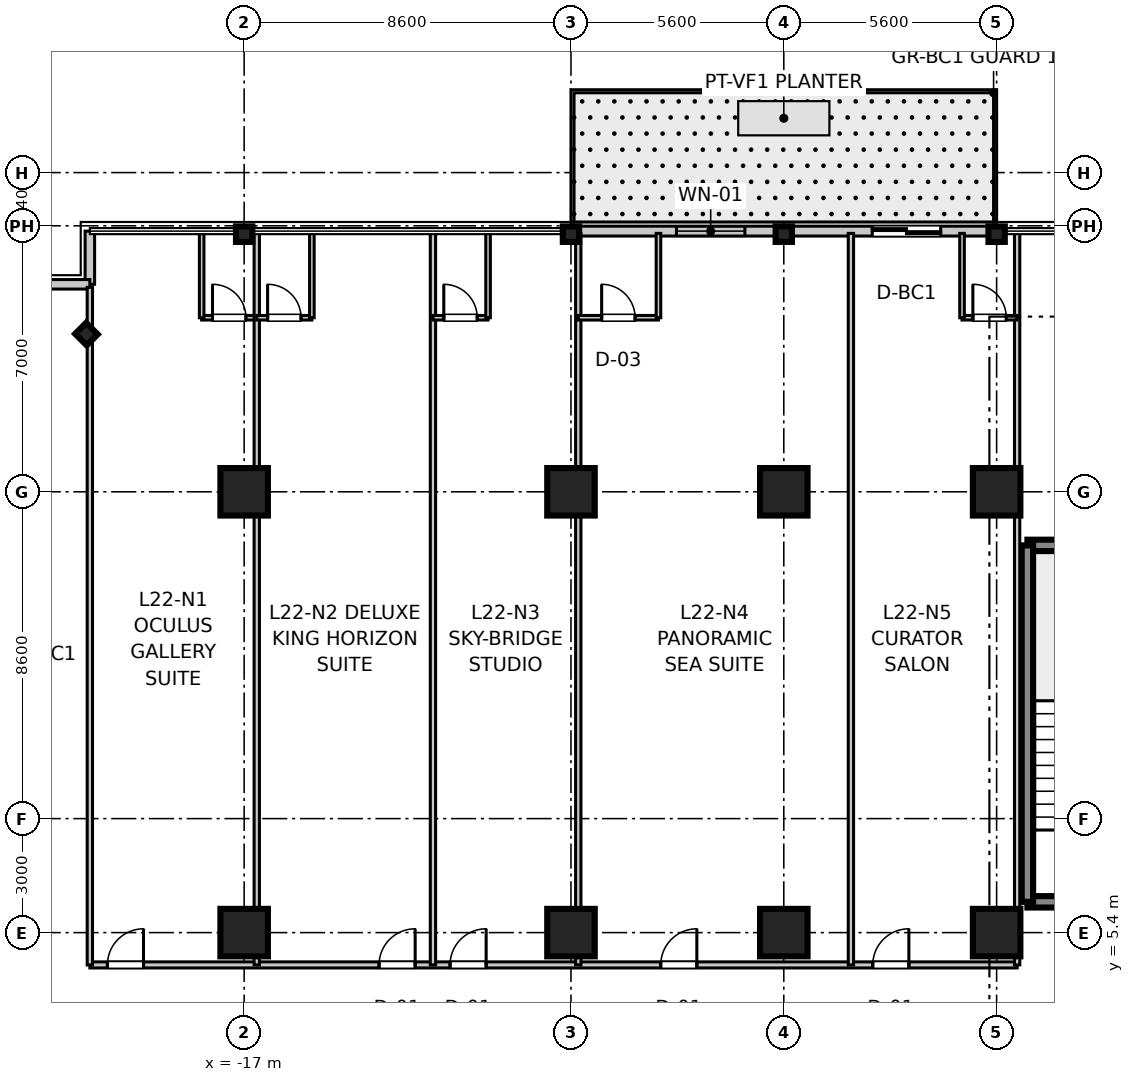
"""IFC4 building model, lengths in metres.
Left out: names, types, materials, properties, quantities, classifications, styles, units other than length and angle.
Written with IfcOpenShell. Run it as: python <this file> out.ifc"""

import sys

from ifc_helpers import new_model, si_unit, direction, frame, frame_2d, origin, origin_2d, place, context, subcontext, project, spatial, rectangle, i_section, extrude, source, transform, mapped, element, fill, save


model = new_model("IFC4")
c1 = context("Model", 3, precision=1e-05, world=origin(), true_north=direction((0.0, 1.0)))
c2 = subcontext(c1, "Body", "Model", "MODEL_VIEW")
j1 = project(units=[si_unit("LENGTHUNIT", "METRE"), si_unit("PLANEANGLEUNIT", "RADIAN")], contexts=[c1])
p1 = place(None, origin())
s1 = spatial("IfcSite", under=j1, at=p1, CompositionType="ELEMENT")
p2 = place(p1, origin())
s2 = spatial("IfcBuilding", under=s1, at=p2, CompositionType="ELEMENT")
p3 = place(p2, frame((0.0, 0.0, 91.95)))
s3 = spatial("IfcBuildingStorey", under=s2, at=p3, CompositionType="ELEMENT", Elevation=91.95)
m1 = source(origin(), c2, "Body", "SweptSolid", [
    extrude(rectangle(XDim=1.25, YDim=1.25, at=origin_2d()), origin(), (0.0, 0.0, 1.0), 3.605),
])
for number, where, z_axis, x_axis in (
    (1, (-17.0, 5.4, 0.0), (0.0, 0.0, 1.0), (1.0, 0.0, 0.0)),
    (2, (-17.0, 17.0, 0.0), (0.0, 0.0, 1.0), (1.0, 0.0, 0.0)),
    (3, (-8.4, 5.4, 0.0), (0.0, 0.0, 1.0), (1.0, 0.0, 0.0)),
    (4, (-8.4, 17.0, 0.0), (0.0, 0.0, 1.0), (1.0, 0.0, 0.0)),
    (5, (-2.8, 5.4, 0.0), (0.0, 0.0, 1.0), (1.0, 0.0, 0.0)),
    (6, (-2.8, 17.0, 0.0), (0.0, 0.0, 1.0), (1.0, 0.0, 0.0)),
    (7, (2.8, 5.4, 0.0), (0.0, 0.0, 1.0), (1.0, 0.0, 0.0)),
    (8, (2.8, 17.0, 0.0), (0.0, 0.0, 1.0), (1.0, 0.0, 0.0)),
):
    element("IfcColumn", number, at=place(p3, frame(where, z_axis=z_axis, x_axis=x_axis)), inside=s3, PredefinedType="COLUMN", context=c2, shape_type="MappedRepresentation", body=[
        mapped(m1, transform((0.0, 0.0, 0.0), scale=1.0)),
    ])
m2 = source(origin(), c2, "Body", "SweptSolid", [
    extrude(i_section(OverallWidth=0.409, OverallDepth=0.43, WebThickness=0.021, FlangeThickness=0.034, at=origin_2d()), origin(), (0.0, 0.0, 1.0), 3.605),
])
for number, where, z_axis, x_axis in (
    (9, (-17.0, 23.78, 0.0), (0.0, 0.0, 1.0), (0.0, 1.0, 0.0)),
    (10, (-8.4, 23.78, 0.0), (0.0, 0.0, 1.0), (0.0, 1.0, 0.0)),
    (11, (-2.8, 23.78, 0.0), (0.0, 0.0, 1.0), (0.0, 1.0, 0.0)),
    (12, (2.8, 23.78, 0.0), (0.0, 0.0, 1.0), (0.0, 1.0, 0.0)),
    (13, (-21.15, 21.15, 0.0), (0.0, 0.0, 1.0), (0.707, 0.707, 0.0)),
):
    element("IfcColumn", number, at=place(p3, frame(where, z_axis=z_axis, x_axis=x_axis)), inside=s3, PredefinedType="COLUMN", context=c2, shape_type="MappedRepresentation", body=[
        mapped(m2, transform((0.0, 0.0, 0.0), scale=1.0)),
    ])
m3 = source(origin(), c2, "Body", "SweptSolid", [
    extrude(rectangle(XDim=3.98, YDim=0.3, at=frame_2d((1.99, 0.0))), origin(), (0.0, 0.0, 1.0), 3.38),
])
for number, where, z_axis, x_axis in (
    (14, (3.61, 6.21, 0.0), (0.0, 0.0, 1.0), (1.0, 0.0, 0.0)),
    (15, (3.61, 15.59, 0.0), (0.0, 0.0, 1.0), (1.0, 0.0, 0.0)),
):
    element("IfcWall", number, at=place(p3, frame(where, z_axis=z_axis, x_axis=x_axis)), inside=s3, PredefinedType="SHEAR", context=c2, shape_type="MappedRepresentation", body=[
        mapped(m3, transform((0.0, 0.0, 0.0), scale=1.0)),
    ])
m4 = source(origin(), c2, "Body", "SweptSolid", [
    extrude(rectangle(XDim=9.38, YDim=0.3, at=frame_2d((4.69, 0.0))), origin(), (0.0, 0.0, 1.0), 3.38),
])
p4 = place(p3, frame((3.61, 6.21, 0.0), z_axis=(0.0, 0.0, 1.0), x_axis=(0.0, 1.0, 0.0)))
e16 = element("IfcWall", 16, at=p4, inside=s3, PredefinedType="SHEAR", context=c2, shape_type="MappedRepresentation", body=[
    mapped(m4, transform((0.0, 0.0, 0.0), scale=1.0)),
])
m5 = source(origin(), c2, "Body", "SweptSolid", [
    extrude(rectangle(XDim=1.4, YDim=0.25, at=frame_2d((0.7, 0.0))), origin(), (0.0, 0.0, 1.0), 3.38),
])
p5 = place(p3, frame((-21.06, 22.46, 0.0), z_axis=(0.0, 0.0, 1.0), x_axis=(0.0, 1.0, 0.0)))
e17 = element("IfcWall", 17, at=p5, inside=s3, PredefinedType="STANDARD", context=c2, shape_type="MappedRepresentation", body=[
    mapped(m5, transform((0.0, 0.0, 0.0), scale=1.0)),
])
m6 = source(origin(), c2, "Body", "SweptSolid", [
    extrude(rectangle(XDim=1.4, YDim=0.25, at=frame_2d((0.7, 0.0))), origin(), (0.0, 0.0, 1.0), 3.38),
])
p6 = place(p3, frame((-22.46, 22.46, 0.0), z_axis=(0.0, 0.0, 1.0), x_axis=(1.0, 0.0, 0.0)))
e18 = element("IfcWall", 18, at=p6, inside=s3, PredefinedType="STANDARD", context=c2, shape_type="MappedRepresentation", body=[
    mapped(m6, transform((0.0, 0.0, 0.0), scale=1.0)),
])
m7 = source(origin(), c2, "Body", "SweptSolid", [
    extrude(rectangle(XDim=11.2, YDim=0.26, at=frame_2d((5.6, 0.0))), origin(), (0.0, 0.0, 1.0), 2.86),
])
p7 = place(p3, frame((-8.4, 23.86, 0.0), z_axis=(0.0, 0.0, 1.0), x_axis=(1.0, 0.0, 0.0)))
e19 = element("IfcWall", 19, at=p7, inside=s3, PredefinedType="STANDARD", context=c2, shape_type="MappedRepresentation", body=[
    mapped(m7, transform((0.0, 0.0, 0.0), scale=1.0)),
])
p8 = place(p7, frame((7.928, 0.0, 0.0)))
e20 = element("IfcOpeningElement", 20, at=p8, cuts=e19, PredefinedType="OPENING", context=c2, shape_type="SweptSolid", body=[
    extrude(rectangle(XDim=1.8, YDim=2.25, at=frame_2d((0.9, 1.125))), frame((0.0, 0.14, 0.0), z_axis=(0.0, -1.0, 0.0), x_axis=(1.0, 0.0, 0.0)), (0.0, 0.0, 1.0), 0.28),
])
p9 = place(p7, frame((2.776, 0.0, 0.85)))
e21 = element("IfcOpeningElement", 21, at=p9, cuts=e19, PredefinedType="OPENING", context=c2, shape_type="SweptSolid", body=[
    extrude(rectangle(XDim=1.8, YDim=1.5, at=frame_2d((0.9, 0.75))), frame((0.0, 0.14, 0.0), z_axis=(0.0, -1.0, 0.0), x_axis=(1.0, 0.0, 0.0)), (0.0, 0.0, 1.0), 0.28),
])
m8 = source(origin(), c2, "Body", "SweptSolid", [
    extrude(rectangle(XDim=24.4, YDim=0.16, at=frame_2d((12.2, 0.0))), origin(), (0.0, 0.0, 1.0), 2.72),
])
p10 = place(p3, frame((-21.06, 4.55, 0.0), z_axis=(0.0, 0.0, 1.0), x_axis=(1.0, 0.0, 0.0)))
e22 = element("IfcWall", 22, at=p10, inside=s3, PredefinedType="PARTITIONING", context=c2, shape_type="MappedRepresentation", body=[
    mapped(m8, transform((0.0, 0.0, 0.0), scale=1.0)),
])
p11 = place(p10, frame((0.462, 0.0, 0.0)))
e23 = element("IfcOpeningElement", 23, at=p11, cuts=e22, PredefinedType="OPENING", context=c2, shape_type="SweptSolid", body=[
    extrude(rectangle(XDim=0.95, YDim=2.1, at=frame_2d((0.475, 1.05))), frame((0.0, 0.09, 0.0), z_axis=(0.0, -1.0, 0.0), x_axis=(1.0, 0.0, 0.0)), (0.0, 0.0, 1.0), 0.18),
])
p12 = place(p10, frame((7.61, 0.0, 0.0)))
e24 = element("IfcOpeningElement", 24, at=p12, cuts=e22, PredefinedType="OPENING", context=c2, shape_type="SweptSolid", body=[
    extrude(rectangle(XDim=0.95, YDim=2.1, at=frame_2d((0.475, 1.05))), frame((0.0, 0.09, 0.0), z_axis=(0.0, -1.0, 0.0), x_axis=(1.0, 0.0, 0.0)), (0.0, 0.0, 1.0), 0.18),
])
p13 = place(p10, frame((9.478, 0.0, 0.0)))
e25 = element("IfcOpeningElement", 25, at=p13, cuts=e22, PredefinedType="OPENING", context=c2, shape_type="SweptSolid", body=[
    extrude(rectangle(XDim=0.95, YDim=2.1, at=frame_2d((0.475, 1.05))), frame((0.0, 0.09, 0.0), z_axis=(0.0, -1.0, 0.0), x_axis=(1.0, 0.0, 0.0)), (0.0, 0.0, 1.0), 0.18),
])
p14 = place(p10, frame((15.022, 0.0, 0.0)))
e26 = element("IfcOpeningElement", 26, at=p14, cuts=e22, PredefinedType="OPENING", context=c2, shape_type="SweptSolid", body=[
    extrude(rectangle(XDim=0.95, YDim=2.1, at=frame_2d((0.475, 1.05))), frame((0.0, 0.09, 0.0), z_axis=(0.0, -1.0, 0.0), x_axis=(1.0, 0.0, 0.0)), (0.0, 0.0, 1.0), 0.18),
])
p15 = place(p10, frame((20.601, 0.0, 0.0)))
e27 = element("IfcOpeningElement", 27, at=p15, cuts=e22, PredefinedType="OPENING", context=c2, shape_type="SweptSolid", body=[
    extrude(rectangle(XDim=0.95, YDim=2.1, at=frame_2d((0.475, 1.05))), frame((0.0, 0.09, 0.0), z_axis=(0.0, -1.0, 0.0), x_axis=(1.0, 0.0, 0.0)), (0.0, 0.0, 1.0), 0.18),
])
m9 = source(origin(), c2, "Body", "SweptSolid", [
    extrude(rectangle(XDim=17.83, YDim=0.14, at=frame_2d((8.915, 0.0))), origin(), (0.0, 0.0, 1.0), 2.72),
])
p16 = place(p3, frame((-21.06, 4.55, 0.0), z_axis=(0.0, 0.0, 1.0), x_axis=(0.0, 1.0, 0.0)))
e28 = element("IfcWall", 28, at=p16, inside=s3, PredefinedType="PARTITIONING", context=c2, shape_type="MappedRepresentation", body=[
    mapped(m9, transform((0.0, 0.0, 0.0), scale=1.0)),
])
m10 = source(origin(), c2, "Body", "SweptSolid", [
    extrude(rectangle(XDim=19.25, YDim=0.14, at=frame_2d((9.625, 0.0))), origin(), (0.0, 0.0, 1.0), 2.72),
])
p17 = place(p3, frame((3.34, 4.55, 0.0), z_axis=(0.0, 0.0, 1.0), x_axis=(0.0, 1.0, 0.0)))
e29 = element("IfcWall", 29, at=p17, inside=s3, PredefinedType="PARTITIONING", context=c2, shape_type="MappedRepresentation", body=[
    mapped(m10, transform((0.0, 0.0, 0.0), scale=1.0)),
])
m11 = source(origin(), c2, "Body", "SweptSolid", [
    extrude(rectangle(XDim=1.45, YDim=0.12, at=frame_2d((0.725, 0.0))), origin(), (0.0, 0.0, 1.0), 2.72),
])
p18 = place(p3, frame((-18.118, 21.58, 0.0), z_axis=(0.0, 0.0, 1.0), x_axis=(1.0, 0.0, 0.0)))
e30 = element("IfcWall", 30, at=p18, inside=s3, PredefinedType="PARTITIONING", context=c2, shape_type="MappedRepresentation", body=[
    mapped(m11, transform((0.0, 0.0, 0.0), scale=1.0)),
])
p19 = place(p18, frame((0.285, 0.0, 0.0)))
e31 = element("IfcOpeningElement", 31, at=p19, cuts=e30, PredefinedType="OPENING", context=c2, shape_type="SweptSolid", body=[
    extrude(rectangle(XDim=0.88, YDim=2.1, at=frame_2d((0.44, 1.05))), frame((0.0, 0.07, 0.0), z_axis=(0.0, -1.0, 0.0), x_axis=(1.0, 0.0, 0.0)), (0.0, 0.0, 1.0), 0.14),
])
m12 = source(origin(), c2, "Body", "SweptSolid", [
    extrude(rectangle(XDim=2.22, YDim=0.12, at=frame_2d((1.11, 0.0))), origin(), (0.0, 0.0, 1.0), 2.72),
])
p20 = place(p3, frame((-18.118, 21.58, 0.0), z_axis=(0.0, 0.0, 1.0), x_axis=(0.0, 1.0, 0.0)))
e32 = element("IfcWall", 32, at=p20, inside=s3, PredefinedType="PARTITIONING", context=c2, shape_type="MappedRepresentation", body=[
    mapped(m12, transform((0.0, 0.0, 0.0), scale=1.0)),
])
p21 = place(p3, frame((-16.668, 4.55, 0.0), z_axis=(0.0, 0.0, 1.0), x_axis=(0.0, 1.0, 0.0)))
e33 = element("IfcWall", 33, at=p21, inside=s3, PredefinedType="PARTITIONING", context=c2, shape_type="MappedRepresentation", body=[
    mapped(m10, transform((0.0, 0.0, 0.0), scale=1.0)),
])
p22 = place(p3, frame((-16.668, 21.58, 0.0), z_axis=(0.0, 0.0, 1.0), x_axis=(1.0, 0.0, 0.0)))
e34 = element("IfcWall", 34, at=p22, inside=s3, PredefinedType="PARTITIONING", context=c2, shape_type="MappedRepresentation", body=[
    mapped(m11, transform((0.0, 0.0, 0.0), scale=1.0)),
])
p23 = place(p22, frame((0.285, 0.0, 0.0)))
e35 = element("IfcOpeningElement", 35, at=p23, cuts=e34, PredefinedType="OPENING", context=c2, shape_type="SweptSolid", body=[
    extrude(rectangle(XDim=0.88, YDim=2.1, at=frame_2d((0.44, 1.05))), frame((0.0, 0.07, 0.0), z_axis=(0.0, -1.0, 0.0), x_axis=(1.0, 0.0, 0.0)), (0.0, 0.0, 1.0), 0.14),
])
p24 = place(p3, frame((-15.218, 21.58, 0.0), z_axis=(0.0, 0.0, 1.0), x_axis=(0.0, 1.0, 0.0)))
e36 = element("IfcWall", 36, at=p24, inside=s3, PredefinedType="PARTITIONING", context=c2, shape_type="MappedRepresentation", body=[
    mapped(m12, transform((0.0, 0.0, 0.0), scale=1.0)),
])
p25 = place(p3, frame((-12.032, 4.55, 0.0), z_axis=(0.0, 0.0, 1.0), x_axis=(0.0, 1.0, 0.0)))
e37 = element("IfcWall", 37, at=p25, inside=s3, PredefinedType="PARTITIONING", context=c2, shape_type="MappedRepresentation", body=[
    mapped(m10, transform((0.0, 0.0, 0.0), scale=1.0)),
])
p26 = place(p3, frame((-12.032, 21.58, 0.0), z_axis=(0.0, 0.0, 1.0), x_axis=(1.0, 0.0, 0.0)))
e38 = element("IfcWall", 38, at=p26, inside=s3, PredefinedType="PARTITIONING", context=c2, shape_type="MappedRepresentation", body=[
    mapped(m11, transform((0.0, 0.0, 0.0), scale=1.0)),
])
p27 = place(p26, frame((0.285, 0.0, 0.0)))
e39 = element("IfcOpeningElement", 39, at=p27, cuts=e38, PredefinedType="OPENING", context=c2, shape_type="SweptSolid", body=[
    extrude(rectangle(XDim=0.88, YDim=2.1, at=frame_2d((0.44, 1.05))), frame((0.0, 0.07, 0.0), z_axis=(0.0, -1.0, 0.0), x_axis=(1.0, 0.0, 0.0)), (0.0, 0.0, 1.0), 0.14),
])
p28 = place(p3, frame((-10.582, 21.58, 0.0), z_axis=(0.0, 0.0, 1.0), x_axis=(0.0, 1.0, 0.0)))
e40 = element("IfcWall", 40, at=p28, inside=s3, PredefinedType="PARTITIONING", context=c2, shape_type="MappedRepresentation", body=[
    mapped(m12, transform((0.0, 0.0, 0.0), scale=1.0)),
])
p29 = place(p3, frame((-8.208, 4.55, 0.0), z_axis=(0.0, 0.0, 1.0), x_axis=(0.0, 1.0, 0.0)))
e41 = element("IfcWall", 41, at=p29, inside=s3, PredefinedType="PARTITIONING", context=c2, shape_type="MappedRepresentation", body=[
    mapped(m10, transform((0.0, 0.0, 0.0), scale=1.0)),
])
m13 = source(origin(), c2, "Body", "SweptSolid", [
    extrude(rectangle(XDim=2.11, YDim=0.12, at=frame_2d((1.055, 0.0))), origin(), (0.0, 0.0, 1.0), 2.72),
])
p30 = place(p3, frame((-8.208, 21.58, 0.0), z_axis=(0.0, 0.0, 1.0), x_axis=(1.0, 0.0, 0.0)))
e42 = element("IfcWall", 42, at=p30, inside=s3, PredefinedType="PARTITIONING", context=c2, shape_type="MappedRepresentation", body=[
    mapped(m13, transform((0.0, 0.0, 0.0), scale=1.0)),
])
p31 = place(p30, frame((0.615, 0.0, 0.0)))
e43 = element("IfcOpeningElement", 43, at=p31, cuts=e42, PredefinedType="OPENING", context=c2, shape_type="SweptSolid", body=[
    extrude(rectangle(XDim=0.88, YDim=2.1, at=frame_2d((0.44, 1.05))), frame((0.0, 0.07, 0.0), z_axis=(0.0, -1.0, 0.0), x_axis=(1.0, 0.0, 0.0)), (0.0, 0.0, 1.0), 0.14),
])
p32 = place(p3, frame((-6.098, 21.58, 0.0), z_axis=(0.0, 0.0, 1.0), x_axis=(0.0, 1.0, 0.0)))
e44 = element("IfcWall", 44, at=p32, inside=s3, PredefinedType="PARTITIONING", context=c2, shape_type="MappedRepresentation", body=[
    mapped(m12, transform((0.0, 0.0, 0.0), scale=1.0)),
])
p33 = place(p3, frame((-1.034, 4.55, 0.0), z_axis=(0.0, 0.0, 1.0), x_axis=(0.0, 1.0, 0.0)))
e45 = element("IfcWall", 45, at=p33, inside=s3, PredefinedType="PARTITIONING", context=c2, shape_type="MappedRepresentation", body=[
    mapped(m10, transform((0.0, 0.0, 0.0), scale=1.0)),
])
m14 = source(origin(), c2, "Body", "SweptSolid", [
    extrude(rectangle(XDim=1.45, YDim=0.12, at=frame_2d((0.725, 0.0))), origin(), (0.0, 0.0, 1.0), 2.72),
])
p34 = place(p3, frame((1.89, 21.58, 0.0), z_axis=(0.0, 0.0, 1.0), x_axis=(1.0, 0.0, 0.0)))
e46 = element("IfcWall", 46, at=p34, inside=s3, PredefinedType="PARTITIONING", context=c2, shape_type="MappedRepresentation", body=[
    mapped(m14, transform((0.0, 0.0, 0.0), scale=1.0)),
])
p35 = place(p34, frame((0.285, 0.0, 0.0)))
e47 = element("IfcOpeningElement", 47, at=p35, cuts=e46, PredefinedType="OPENING", context=c2, shape_type="SweptSolid", body=[
    extrude(rectangle(XDim=0.88, YDim=2.1, at=frame_2d((0.44, 1.05))), frame((0.0, 0.07, 0.0), z_axis=(0.0, -1.0, 0.0), x_axis=(1.0, 0.0, 0.0)), (0.0, 0.0, 1.0), 0.14),
])
p36 = place(p3, frame((1.89, 21.58, 0.0), z_axis=(0.0, 0.0, 1.0), x_axis=(0.0, 1.0, 0.0)))
e48 = element("IfcWall", 48, at=p36, inside=s3, PredefinedType="PARTITIONING", context=c2, shape_type="MappedRepresentation", body=[
    mapped(m12, transform((0.0, 0.0, 0.0), scale=1.0)),
])
m15 = source(origin(), c2, "Body", "SweptSolid", [
    extrude(rectangle(XDim=0.88, YDim=2.1, at=frame_2d((0.44, 1.05))), frame((0.0, 0.025, 0.0), z_axis=(0.0, -1.0, 0.0), x_axis=(1.0, 0.0, 0.0)), (0.0, 0.0, 1.0), 0.05),
])
p37 = place(p19, origin())
e49 = element("IfcDoor", 49, at=p37, inside=s3, OperationType="SINGLE_SWING_LEFT", PredefinedType="DOOR", context=c2, shape_type="MappedRepresentation", body=[
    mapped(m15, transform((0.0, 0.0, 0.0), scale=1.0)),
])
fill(e31, e49)
m16 = source(origin(), c2, "Body", "SweptSolid", [
    extrude(rectangle(XDim=0.95, YDim=2.1, at=frame_2d((0.475, 1.05))), frame((0.0, 0.025, 0.0), z_axis=(0.0, -1.0, 0.0), x_axis=(1.0, 0.0, 0.0)), (0.0, 0.0, 1.0), 0.05),
])
p38 = place(p11, origin())
e50 = element("IfcDoor", 50, at=p38, inside=s3, OperationType="SINGLE_SWING_RIGHT", PredefinedType="DOOR", context=c2, shape_type="MappedRepresentation", body=[
    mapped(m16, transform((0.0, 0.0, 0.0), scale=1.0)),
])
fill(e23, e50)
p39 = place(p23, origin())
e51 = element("IfcDoor", 51, at=p39, inside=s3, OperationType="SINGLE_SWING_LEFT", PredefinedType="DOOR", context=c2, shape_type="MappedRepresentation", body=[
    mapped(m15, transform((0.0, 0.0, 0.0), scale=1.0)),
])
fill(e35, e51)
p40 = place(p12, origin())
e52 = element("IfcDoor", 52, at=p40, inside=s3, OperationType="SINGLE_SWING_RIGHT", PredefinedType="DOOR", context=c2, shape_type="MappedRepresentation", body=[
    mapped(m16, transform((0.0, 0.0, 0.0), scale=1.0)),
])
fill(e24, e52)
p41 = place(p27, origin())
e53 = element("IfcDoor", 53, at=p41, inside=s3, OperationType="SINGLE_SWING_LEFT", PredefinedType="DOOR", context=c2, shape_type="MappedRepresentation", body=[
    mapped(m15, transform((0.0, 0.0, 0.0), scale=1.0)),
])
fill(e39, e53)
p42 = place(p13, origin())
e54 = element("IfcDoor", 54, at=p42, inside=s3, OperationType="SINGLE_SWING_RIGHT", PredefinedType="DOOR", context=c2, shape_type="MappedRepresentation", body=[
    mapped(m16, transform((0.0, 0.0, 0.0), scale=1.0)),
])
fill(e25, e54)
p43 = place(p31, origin())
e55 = element("IfcDoor", 55, at=p43, inside=s3, OperationType="SINGLE_SWING_LEFT", PredefinedType="DOOR", context=c2, shape_type="MappedRepresentation", body=[
    mapped(m15, transform((0.0, 0.0, 0.0), scale=1.0)),
])
fill(e43, e55)
p44 = place(p14, origin())
e56 = element("IfcDoor", 56, at=p44, inside=s3, OperationType="SINGLE_SWING_RIGHT", PredefinedType="DOOR", context=c2, shape_type="MappedRepresentation", body=[
    mapped(m16, transform((0.0, 0.0, 0.0), scale=1.0)),
])
fill(e26, e56)
p45 = place(p35, origin())
e57 = element("IfcDoor", 57, at=p45, inside=s3, OperationType="SINGLE_SWING_LEFT", PredefinedType="DOOR", context=c2, shape_type="MappedRepresentation", body=[
    mapped(m15, transform((0.0, 0.0, 0.0), scale=1.0)),
])
fill(e47, e57)
p46 = place(p15, origin())
e58 = element("IfcDoor", 58, at=p46, inside=s3, OperationType="SINGLE_SWING_RIGHT", PredefinedType="DOOR", context=c2, shape_type="MappedRepresentation", body=[
    mapped(m16, transform((0.0, 0.0, 0.0), scale=1.0)),
])
fill(e27, e58)
m17 = source(origin(), c2, "Body", "SweptSolid", [
    extrude(rectangle(XDim=1.8, YDim=2.25, at=frame_2d((0.9, 1.125))), frame((0.0, 0.025, 0.0), z_axis=(0.0, -1.0, 0.0), x_axis=(1.0, 0.0, 0.0)), (0.0, 0.0, 1.0), 0.05),
])
p47 = place(p8, origin())
e59 = element("IfcDoor", 59, at=p47, inside=s3, OperationType="DOUBLE_DOOR_SLIDING", PredefinedType="DOOR", context=c2, shape_type="MappedRepresentation", body=[
    mapped(m17, transform((0.0, 0.0, 0.0), scale=1.0)),
])
fill(e20, e59)
m18 = source(origin(), c2, "Body", "SweptSolid", [
    extrude(rectangle(XDim=1.8, YDim=1.5, at=frame_2d((0.9, 0.75))), frame((0.0, 0.03, 0.0), z_axis=(0.0, -1.0, 0.0), x_axis=(1.0, 0.0, 0.0)), (0.0, 0.0, 1.0), 0.06),
])
p48 = place(p9, origin())
e60 = element("IfcWindow", 60, at=p48, inside=s3, PartitioningType="SINGLE_PANEL", PredefinedType="WINDOW", context=c2, shape_type="MappedRepresentation", body=[
    mapped(m18, transform((0.0, 0.0, 0.0), scale=1.0)),
])
fill(e21, e60)
save(model, sys.argv[1])
